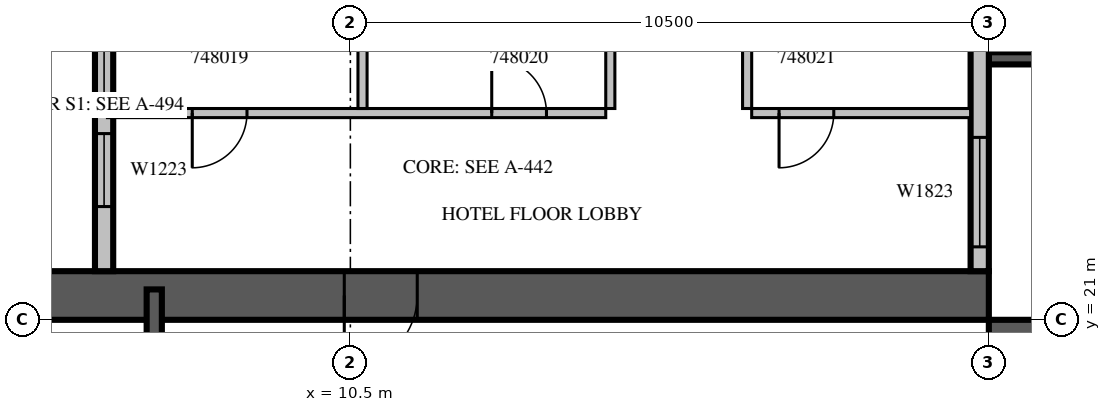
"""IFC4 building model, lengths in metres.
Left out: names, types, materials, properties, quantities, classifications, styles, units other than length and angle.
Written with IfcOpenShell. Run it as: python <this file> out.ifc"""

import sys

from ifc_helpers import new_model, si_unit, direction, frame, frame_2d, origin, place, context, subcontext, project, spatial, rectangle, extrude, source, transform, mapped, element, fill, save


model = new_model("IFC4")
c1 = context("Model", 3, precision=1e-05, world=origin(), true_north=direction((0.0, 1.0)))
c2 = subcontext(c1, "Body", "Model", "MODEL_VIEW")
j1 = project(units=[si_unit("LENGTHUNIT", "METRE"), si_unit("PLANEANGLEUNIT", "RADIAN")], contexts=[c1])
p1 = place(None, origin())
s1 = spatial("IfcSite", under=j1, at=p1, CompositionType="ELEMENT")
p2 = place(p1, origin())
s2 = spatial("IfcBuilding", under=s1, at=p2, CompositionType="ELEMENT")
p3 = place(p2, frame((0.0, 0.0, 215.8)))
s3 = spatial("IfcBuildingStorey", under=s2, at=p3, CompositionType="ELEMENT", Elevation=215.8)
m1 = source(origin(), c2, "Body", "SweptSolid", [
    extrude(rectangle(XDim=16.8, YDim=0.8, at=frame_2d((8.4, 0.0))), origin(), (0.0, 0.0, 1.0), 3.8),
])
p4 = place(p3, frame((21.4, 4.2, 0.0), z_axis=(0.0, 0.0, 1.0), x_axis=(0.0, 1.0, 0.0)))
e1 = element("IfcWall", 1, at=p4, inside=s3, PredefinedType="SHEAR", context=c2, shape_type="MappedRepresentation", body=[
    mapped(m1, transform((0.0, 0.0, 0.0), scale=1.0)),
])
m2 = source(origin(), c2, "Body", "SweptSolid", [
    extrude(rectangle(XDim=2.2, YDim=2.1, at=frame_2d((1.1, 1.05))), frame((0.0, 0.41, 0.0), z_axis=(0.0, -1.0, 0.0), x_axis=(1.0, 0.0, 0.0)), (0.0, 0.0, 1.0), 0.82),
])
p5 = place(p4, frame((4.2, 0.0, 0.0)))
e2 = element("IfcOpeningElement", 2, at=p5, cuts=e1, PredefinedType="OPENING", context=c2, shape_type="MappedRepresentation", body=[
    mapped(m2, transform((0.0, 0.0, 0.0), scale=1.0)),
])
m3 = source(origin(), c2, "Body", "SweptSolid", [
    extrude(rectangle(XDim=1.2, YDim=2.1, at=frame_2d((0.6, 1.05))), frame((0.0, 0.41, 0.0), z_axis=(0.0, -1.0, 0.0), x_axis=(1.0, 0.0, 0.0)), (0.0, 0.0, 1.0), 0.82),
])
p6 = place(p4, frame((14.7, 0.0, 0.0)))
e3 = element("IfcOpeningElement", 3, at=p6, cuts=e1, PredefinedType="OPENING", context=c2, shape_type="MappedRepresentation", body=[
    mapped(m3, transform((0.0, 0.0, 0.0), scale=1.0)),
])
p7 = place(p3, frame((4.2, 21.4, 0.0), z_axis=(0.0, 0.0, 1.0), x_axis=(1.0, 0.0, 0.0)))
e4 = element("IfcWall", 4, at=p7, inside=s3, PredefinedType="SHEAR", context=c2, shape_type="MappedRepresentation", body=[
    mapped(m1, transform((0.0, 0.0, 0.0), scale=1.0)),
])
p8 = place(p7, frame((6.2, 0.0, 0.0)))
e5 = element("IfcOpeningElement", 5, at=p8, cuts=e4, PredefinedType="OPENING", context=c2, shape_type="MappedRepresentation", body=[
    mapped(m3, transform((0.0, 0.0, 0.0), scale=1.0)),
])
m4 = source(origin(), c2, "Body", "SweptSolid", [
    extrude(rectangle(XDim=3.9, YDim=0.2, at=frame_2d((1.95, 0.0))), origin(), (0.0, 0.0, 1.0), 3.4),
])
p9 = place(p3, frame((21.0, 25.3, 0.0), z_axis=(0.0, 0.0, 1.0), x_axis=(1.0, 0.0, 0.0)))
e6 = element("IfcWall", 6, at=p9, inside=s3, PredefinedType="SOLIDWALL", context=c2, shape_type="MappedRepresentation", body=[
    mapped(m4, transform((0.0, 0.0, 0.0), scale=1.0)),
])
m5 = source(origin(), c2, "Body", "SweptSolid", [
    extrude(rectangle(XDim=2.4, YDim=2.3, at=frame_2d((1.2, 1.15))), frame((0.0, 0.11, 0.0), z_axis=(0.0, -1.0, 0.0), x_axis=(1.0, 0.0, 0.0)), (0.0, 0.0, 1.0), 0.22),
])
p10 = place(p9, frame((0.75, 0.0, 0.6)))
e7 = element("IfcOpeningElement", 7, at=p10, cuts=e6, PredefinedType="OPENING", context=c2, shape_type="MappedRepresentation", body=[
    mapped(m5, transform((0.0, 0.0, 0.0), scale=1.0)),
])
m6 = source(origin(), c2, "Body", "SweptSolid", [
    extrude(rectangle(XDim=7.15, YDim=0.3, at=frame_2d((3.575, 0.0))), origin(), (0.0, 0.0, 1.0), 3.4),
])
p11 = place(p3, frame((20.85, 21.8, 0.0), z_axis=(0.0, 0.0, 1.0), x_axis=(0.0, 1.0, 0.0)))
e8 = element("IfcWall", 8, at=p11, inside=s3, PredefinedType="STANDARD", context=c2, shape_type="MappedRepresentation", body=[
    mapped(m6, transform((0.0, 0.0, 0.0), scale=1.0)),
])
m7 = source(origin(), c2, "Body", "SweptSolid", [
    extrude(rectangle(XDim=1.8, YDim=2.3, at=frame_2d((0.9, 1.15))), frame((0.0, 0.16, 0.0), z_axis=(0.0, -1.0, 0.0), x_axis=(1.0, 0.0, 0.0)), (0.0, 0.0, 1.0), 0.32),
])
p12 = place(p11, frame((0.4, 0.0, 0.6)))
e9 = element("IfcOpeningElement", 9, at=p12, cuts=e8, PredefinedType="OPENING", context=c2, shape_type="MappedRepresentation", body=[
    mapped(m7, transform((0.0, 0.0, 0.0), scale=1.0)),
])
m8 = source(origin(), c2, "Body", "SweptSolid", [
    extrude(rectangle(XDim=1.0, YDim=2.1, at=frame_2d((0.5, 1.05))), frame((0.0, 0.16, 0.0), z_axis=(0.0, -1.0, 0.0), x_axis=(1.0, 0.0, 0.0)), (0.0, 0.0, 1.0), 0.32),
])
p13 = place(p11, frame((5.0, 0.0, 0.0)))
e10 = element("IfcOpeningElement", 10, at=p13, cuts=e8, PredefinedType="OPENING", context=c2, shape_type="MappedRepresentation", body=[
    mapped(m8, transform((0.0, 0.0, 0.0), scale=1.0)),
])
m9 = source(origin(), c2, "Body", "SweptSolid", [
    extrude(rectangle(XDim=16.6, YDim=0.3, at=frame_2d((8.3, 0.0))), origin(), (0.0, 0.0, 1.0), 2.9),
])
p14 = place(p3, frame((6.45, 38.4, 0.0), z_axis=(0.0, 0.0, 1.0), x_axis=(0.0, -1.0, 0.0)))
e11 = element("IfcWall", 11, at=p14, inside=s3, PredefinedType="STANDARD", context=c2, shape_type="MappedRepresentation", body=[
    mapped(m9, transform((0.0, 0.0, 0.0), scale=1.0)),
])
p15 = place(p14, frame((1.15, 0.0, 0.6)))
e12 = element("IfcOpeningElement", 12, at=p15, cuts=e11, PredefinedType="OPENING", context=c2, shape_type="MappedRepresentation", body=[
    mapped(m7, transform((0.0, 0.0, 0.0), scale=1.0)),
])
p16 = place(p14, frame((5.162, 0.0, 0.6)))
e13 = element("IfcOpeningElement", 13, at=p16, cuts=e11, PredefinedType="OPENING", context=c2, shape_type="MappedRepresentation", body=[
    mapped(m7, transform((0.0, 0.0, 0.0), scale=1.0)),
])
p17 = place(p14, frame((9.438, 0.0, 0.6)))
e14 = element("IfcOpeningElement", 14, at=p17, cuts=e11, PredefinedType="OPENING", context=c2, shape_type="MappedRepresentation", body=[
    mapped(m7, transform((0.0, 0.0, 0.0), scale=1.0)),
])
m10 = source(origin(), c2, "Body", "SweptSolid", [
    extrude(rectangle(XDim=1.2, YDim=2.3, at=frame_2d((0.6, 1.15))), frame((0.0, 0.16, 0.0), z_axis=(0.0, -1.0, 0.0), x_axis=(1.0, 0.0, 0.0)), (0.0, 0.0, 1.0), 0.32),
])
p18 = place(p14, frame((14.338, 0.0, 0.6)))
e15 = element("IfcOpeningElement", 15, at=p18, cuts=e11, PredefinedType="OPENING", context=c2, shape_type="MappedRepresentation", body=[
    mapped(m10, transform((0.0, 0.0, 0.0), scale=1.0)),
])
p19 = place(p14, frame((11.887, 0.0, 0.6)))
e16 = element("IfcOpeningElement", 16, at=p19, cuts=e11, PredefinedType="OPENING", context=c2, shape_type="MappedRepresentation", body=[
    mapped(m7, transform((0.0, 0.0, 0.0), scale=1.0)),
])
m11 = source(origin(), c2, "Body", "SweptSolid", [
    extrude(rectangle(XDim=6.6, YDim=0.25, at=frame_2d((3.3, 0.0))), origin(), (0.0, 0.0, 1.0), 3.4),
])
p20 = place(p3, frame((7.275, 14.9, 0.0), z_axis=(0.0, 0.0, 1.0), x_axis=(0.0, 1.0, 0.0)))
e17 = element("IfcWall", 17, at=p20, inside=s3, PredefinedType="SOLIDWALL", context=c2, shape_type="MappedRepresentation", body=[
    mapped(m11, transform((0.0, 0.0, 0.0), scale=1.0)),
])
m12 = source(origin(), c2, "Body", "SweptSolid", [
    extrude(rectangle(XDim=1.1, YDim=2.1, at=frame_2d((0.55, 1.05))), frame((0.0, 0.135, 0.0), z_axis=(0.0, -1.0, 0.0), x_axis=(1.0, 0.0, 0.0)), (0.0, 0.0, 1.0), 0.27),
])
p21 = place(p20, frame((0.15, 0.0, 0.0)))
e18 = element("IfcOpeningElement", 18, at=p21, cuts=e17, PredefinedType="OPENING", context=c2, shape_type="MappedRepresentation", body=[
    mapped(m12, transform((0.0, 0.0, 0.0), scale=1.0)),
])
m13 = source(origin(), c2, "Body", "SweptSolid", [
    extrude(rectangle(XDim=8.195, YDim=0.15, at=frame_2d((4.098, 0.0))), origin(), (0.0, 0.0, 1.0), 3.4),
])
p22 = place(p3, frame((6.505, 24.4, 0.0), z_axis=(0.0, 0.0, 1.0), x_axis=(1.0, 0.0, 0.0)))
e19 = element("IfcWall", 19, at=p22, inside=s3, PredefinedType="PARTITIONING", context=c2, shape_type="MappedRepresentation", body=[
    mapped(m13, transform((0.0, 0.0, 0.0), scale=1.0)),
])
m14 = source(origin(), c2, "Body", "SweptSolid", [
    extrude(rectangle(XDim=0.9, YDim=2.1, at=frame_2d((0.45, 1.05))), frame((0.0, 0.085, 0.0), z_axis=(0.0, -1.0, 0.0), x_axis=(1.0, 0.0, 0.0)), (0.0, 0.0, 1.0), 0.17),
])
p23 = place(p22, frame((1.395, 0.0, 0.0)))
e20 = element("IfcOpeningElement", 20, at=p23, cuts=e19, PredefinedType="OPENING", context=c2, shape_type="MappedRepresentation", body=[
    mapped(m14, transform((0.0, 0.0, 0.0), scale=1.0)),
])
p24 = place(p22, frame((6.32, 0.0, 0.0)))
e21 = element("IfcOpeningElement", 21, at=p24, cuts=e19, PredefinedType="OPENING", context=c2, shape_type="MappedRepresentation", body=[
    mapped(m14, transform((0.0, 0.0, 0.0), scale=1.0)),
])
m15 = source(origin(), c2, "Body", "SweptSolid", [
    extrude(rectangle(XDim=3.6, YDim=0.15, at=frame_2d((1.8, 0.0))), origin(), (0.0, 0.0, 1.0), 3.4),
])
p25 = place(p3, frame((17.1, 24.4, 0.0), z_axis=(0.0, 0.0, 1.0), x_axis=(1.0, 0.0, 0.0)))
e22 = element("IfcWall", 22, at=p25, inside=s3, PredefinedType="PARTITIONING", context=c2, shape_type="MappedRepresentation", body=[
    mapped(m15, transform((0.0, 0.0, 0.0), scale=1.0)),
])
p26 = place(p25, frame((0.45, 0.0, 0.0)))
e23 = element("IfcOpeningElement", 23, at=p26, cuts=e22, PredefinedType="OPENING", context=c2, shape_type="MappedRepresentation", body=[
    mapped(m14, transform((0.0, 0.0, 0.0), scale=1.0)),
])
p27 = place(p3, frame((10.7, 24.475, 0.0), z_axis=(0.0, 0.0, 1.0), x_axis=(0.0, 1.0, 0.0)))
e24 = element("IfcWall", 24, at=p27, inside=s3, PredefinedType="PARTITIONING", context=c2, shape_type="SweptSolid", body=[
    extrude(rectangle(XDim=4.476, YDim=0.15, at=frame_2d((2.238, 0.0))), origin(), (0.0, 0.0, 1.0), 3.4),
])
m16 = source(origin(), c2, "Body", "SweptSolid", [
    extrude(rectangle(XDim=4.85, YDim=0.15, at=frame_2d((2.425, 0.0))), origin(), (0.0, 0.0, 1.0), 3.4),
])
for number, where, z_axis, x_axis in (
    (25, (14.775, 24.475, 0.0), (0.0, 0.0, 1.0), (0.0, 1.0, 0.0)),
    (26, (17.025, 29.325, 0.0), (0.0, 0.0, 1.0), (0.0, -1.0, 0.0)),
):
    element("IfcWall", number, at=place(p3, frame(where, z_axis=z_axis, x_axis=x_axis)), inside=s3, PredefinedType="PARTITIONING", context=c2, shape_type="MappedRepresentation", body=[
        mapped(m16, transform((0.0, 0.0, 0.0), scale=1.0)),
    ])
m17 = source(origin(), c2, "Body", "SweptSolid", [
    extrude(rectangle(XDim=1.8, YDim=2.3, at=frame_2d((0.9, 1.15))), frame((0.0, 0.03, 0.0), z_axis=(0.0, -1.0, 0.0), x_axis=(1.0, 0.0, 0.0)), (0.0, 0.0, 1.0), 0.06),
])
p28 = place(p12, origin())
e27 = element("IfcWindow", 27, at=p28, inside=s3, PartitioningType="SINGLE_PANEL", PredefinedType="WINDOW", context=c2, shape_type="MappedRepresentation", body=[
    mapped(m17, transform((0.0, 0.0, 0.0), scale=1.0)),
])
fill(e9, e27)
m18 = source(origin(), c2, "Body", "SweptSolid", [
    extrude(rectangle(XDim=1.2, YDim=2.3, at=frame_2d((0.6, 1.15))), frame((0.0, 0.03, 0.0), z_axis=(0.0, -1.0, 0.0), x_axis=(1.0, 0.0, 0.0)), (0.0, 0.0, 1.0), 0.06),
])
p29 = place(p18, origin())
e28 = element("IfcWindow", 28, at=p29, inside=s3, PartitioningType="SINGLE_PANEL", PredefinedType="WINDOW", context=c2, shape_type="MappedRepresentation", body=[
    mapped(m18, transform((0.0, 0.0, 0.0), scale=1.0)),
])
fill(e15, e28)
p30 = place(p19, origin())
e29 = element("IfcWindow", 29, at=p30, inside=s3, PartitioningType="SINGLE_PANEL", PredefinedType="WINDOW", context=c2, shape_type="MappedRepresentation", body=[
    mapped(m17, transform((0.0, 0.0, 0.0), scale=1.0)),
])
fill(e16, e29)
m19 = source(origin(), c2, "Body", "SweptSolid", [
    extrude(rectangle(XDim=1.2, YDim=2.1, at=frame_2d((0.6, 1.05))), frame((0.0, 0.025, 0.0), z_axis=(0.0, -1.0, 0.0), x_axis=(1.0, 0.0, 0.0)), (0.0, 0.0, 1.0), 0.05),
])
p31 = place(p8, origin())
e30 = element("IfcDoor", 30, at=p31, inside=s3, OperationType="SINGLE_SWING_RIGHT", PredefinedType="DOOR", context=c2, shape_type="MappedRepresentation", body=[
    mapped(m19, transform((0.0, 0.0, 0.0), scale=1.0)),
])
fill(e5, e30)
m20 = source(origin(), c2, "Body", "SweptSolid", [
    extrude(rectangle(XDim=0.9, YDim=2.1, at=frame_2d((0.45, 1.05))), frame((0.0, 0.025, 0.0), z_axis=(0.0, -1.0, 0.0), x_axis=(1.0, 0.0, 0.0)), (0.0, 0.0, 1.0), 0.05),
])
p32 = place(p23, origin())
e31 = element("IfcDoor", 31, at=p32, inside=s3, OperationType="SINGLE_SWING_RIGHT", PredefinedType="DOOR", context=c2, shape_type="MappedRepresentation", body=[
    mapped(m20, transform((0.0, 0.0, 0.0), scale=1.0)),
])
fill(e20, e31)
p33 = place(p24, origin())
e32 = element("IfcDoor", 32, at=p33, inside=s3, OperationType="SINGLE_SWING_LEFT", PredefinedType="DOOR", context=c2, shape_type="MappedRepresentation", body=[
    mapped(m20, transform((0.0, 0.0, 0.0), scale=1.0)),
])
fill(e21, e32)
p34 = place(p26, origin())
e33 = element("IfcDoor", 33, at=p34, inside=s3, OperationType="SINGLE_SWING_RIGHT", PredefinedType="DOOR", context=c2, shape_type="MappedRepresentation", body=[
    mapped(m20, transform((0.0, 0.0, 0.0), scale=1.0)),
])
fill(e23, e33)
save(model, sys.argv[1])
